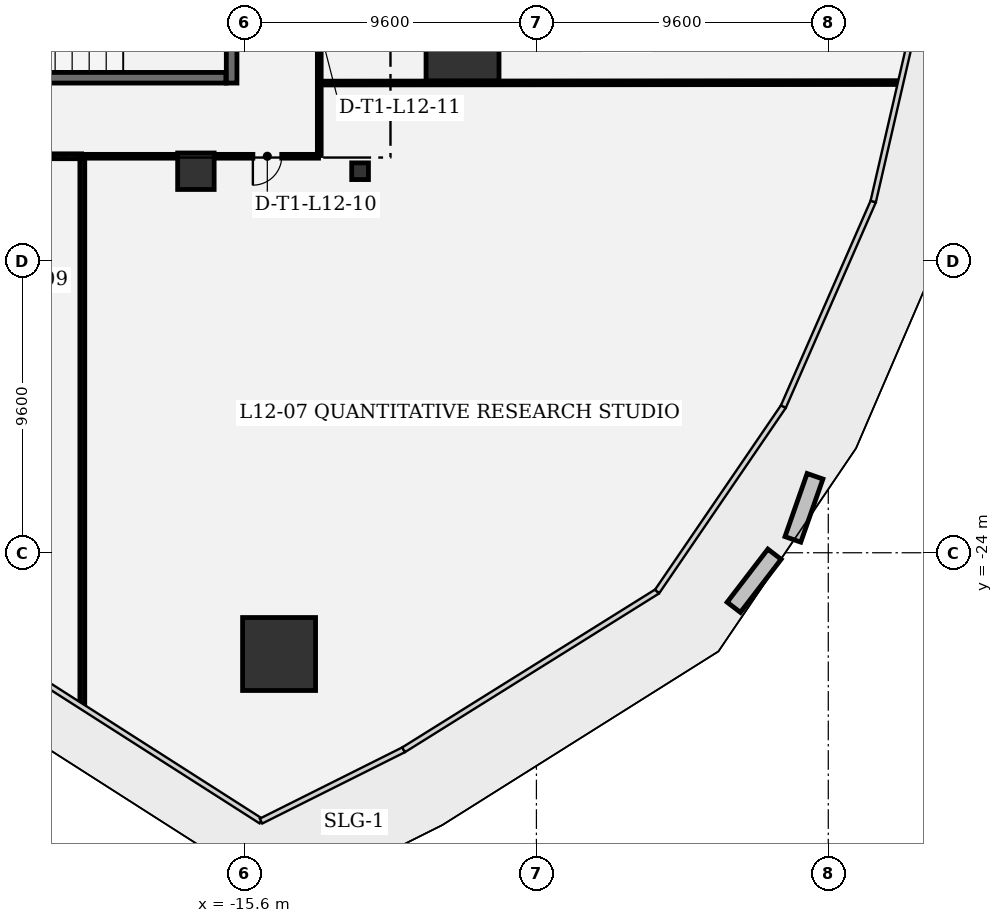
"""IFC4 building model, lengths in metres.
Left out: names, types, materials, properties, quantities, classifications, styles, units other than length and angle.
Written with IfcOpenShell. Run it as: python <this file> out.ifc"""

import sys

from ifc_helpers import new_model, si_unit, direction, frame, frame_2d, origin, origin_2d, place, context, subcontext, project, spatial, rectangle, extrude, element, fill, save


model = new_model("IFC4")
c1 = context("Model", 3, precision=1e-05, world=origin(), true_north=direction((0.0, 1.0)))
c2 = subcontext(c1, "Body", "Model", "MODEL_VIEW")
j1 = project(units=[si_unit("LENGTHUNIT", "METRE"), si_unit("PLANEANGLEUNIT", "RADIAN")], contexts=[c1])
p1 = place(None, origin())
s1 = spatial("IfcSite", under=j1, at=p1, CompositionType="ELEMENT")
p2 = place(p1, origin())
s2 = spatial("IfcBuilding", under=s1, at=p2, CompositionType="ELEMENT")
p3 = place(p2, frame((0.0, 0.0, 57.6)))
s3 = spatial("IfcBuildingStorey", under=s2, at=p3, CompositionType="ELEMENT", Elevation=57.6)
for number, where, z_axis, x_axis in (
    (1, (-14.464, -27.331, 0.0), (0.0, 0.0, 1.0), (1.0, 0.0, 0.0)),
    (2, (-8.43, -7.276, 0.0), (0.0, 0.0, 1.0), (1.0, 0.0, 0.0)),
):
    element("IfcColumn", number, at=place(p3, frame(where, z_axis=z_axis, x_axis=x_axis)), inside=s3, PredefinedType="COLUMN", context=c2, shape_type="SweptSolid", body=[
        extrude(rectangle(XDim=2.4, YDim=2.4, at=origin_2d()), origin(), (0.0, 0.0, 1.0), 4.2),
    ])
p4 = place(p3, frame((-17.2, -11.45, 0.0), z_axis=(0.0, 0.0, 1.0), x_axis=(1.0, 0.0, 0.0)))
e3 = element("IfcColumn", 3, at=p4, inside=s3, PredefinedType="COLUMN", context=c2, shape_type="SweptSolid", body=[
    extrude(rectangle(XDim=1.2, YDim=1.2, at=origin_2d()), origin(), (0.0, 0.0, 1.0), 4.2),
])
p5 = place(p3, frame((-11.8, -11.45, 0.0), z_axis=(0.0, 0.0, 1.0), x_axis=(1.0, 0.0, 0.0)))
e4 = element("IfcColumn", 4, at=p5, inside=s3, PredefinedType="COLUMN", context=c2, shape_type="SweptSolid", body=[
    extrude(rectangle(XDim=0.55, YDim=0.55, at=origin_2d()), origin(), (0.0, 0.0, 1.0), 4.2),
])
p6 = place(p3, frame((-16.025, -8.55, 0.0), z_axis=(0.0, 0.0, 1.0), x_axis=(0.0, 1.0, 0.0)))
e5 = element("IfcWall", 5, at=p6, inside=s3, PredefinedType="SHEAR", context=c2, shape_type="SweptSolid", body=[
    extrude(rectangle(XDim=4.61, YDim=0.35, at=frame_2d((2.305, 0.0))), origin(), (0.0, 0.0, 1.0), 3.92),
])
p7 = place(p3, frame((-24.335, -8.375, 0.0), z_axis=(0.0, 0.0, 1.0), x_axis=(1.0, 0.0, 0.0)))
e6 = element("IfcWall", 6, at=p7, inside=s3, PredefinedType="SHEAR", context=c2, shape_type="SweptSolid", body=[
    extrude(rectangle(XDim=8.12, YDim=0.35, at=frame_2d((4.06, 0.0))), origin(), (0.0, 0.0, 1.0), 3.92),
])
p8 = place(p7, frame((0.28, 0.0, 0.0)))
e7 = element("IfcOpeningElement", 7, at=p8, cuts=e6, PredefinedType="OPENING", context=c2, shape_type="SweptSolid", body=[
    extrude(rectangle(XDim=1.1, YDim=2.2, at=frame_2d((0.55, 1.1))), frame((0.0, 0.185, 0.0), z_axis=(0.0, -1.0, 0.0), x_axis=(1.0, 0.0, 0.0)), (0.0, 0.0, 1.0), 0.37),
])
p9 = place(p3, frame((-20.936, -28.989, 0.0), z_axis=(0.0, 0.0, 1.0), x_axis=(0.0, 1.0, 0.0)))
e8 = element("IfcWall", 8, at=p9, inside=s3, PredefinedType="PARTITIONING", context=c2, shape_type="SweptSolid", body=[
    extrude(rectangle(XDim=18.006, YDim=0.16, at=frame_2d((9.003, 0.0))), origin(), (0.0, 0.0, 1.0), 2.957),
])
p10 = place(p3, frame((-20.961, -10.958, 0.0), z_axis=(0.0, 0.0, 1.0), x_axis=(-1.0, 0.0, 0.0)))
e9 = element("IfcWall", 9, at=p10, inside=s3, PredefinedType="PARTITIONING", context=c2, shape_type="SweptSolid", body=[
    extrude(rectangle(XDim=1.974, YDim=0.16, at=frame_2d((0.987, 0.0))), origin(), (0.0, 0.0, 1.0), 3.92),
])
p11 = place(p3, frame((5.9, -8.534, 0.0), z_axis=(0.0, 0.0, 1.0), x_axis=(-0.99999966248, -0.000821608021, 0.0)))
e10 = element("IfcWall", 10, at=p11, inside=s3, PredefinedType="PARTITIONING", context=c2, shape_type="SweptSolid", body=[
    extrude(rectangle(XDim=19.018, YDim=0.125, at=frame_2d((9.509, 0.0))), origin(), (0.0, 0.0, 1.0), 2.957),
])
p12 = place(p3, frame((-13.142, -8.575, 0.0), z_axis=(0.0, 0.0, 1.0), x_axis=(0.0, -1.0, 0.0)))
e11 = element("IfcWall", 11, at=p12, inside=s3, PredefinedType="PARTITIONING", context=c2, shape_type="SweptSolid", body=[
    extrude(rectangle(XDim=2.358, YDim=0.125, at=frame_2d((1.179, 0.0))), origin(), (0.0, 0.0, 1.0), 3.92),
])
p13 = place(p3, frame((-13.167, -10.958, 0.0), z_axis=(0.0, 0.0, 1.0), x_axis=(-1.0, 0.0, 0.0)))
e12 = element("IfcWall", 12, at=p13, inside=s3, PredefinedType="PARTITIONING", context=c2, shape_type="SweptSolid", body=[
    extrude(rectangle(XDim=3.368, YDim=0.125, at=frame_2d((1.684, 0.0))), origin(), (0.0, 0.0, 1.0), 2.957),
])
p14 = place(p13, frame((1.209, 0.0, 0.0)))
e13 = element("IfcOpeningElement", 13, at=p14, cuts=e12, PredefinedType="OPENING", context=c2, shape_type="SweptSolid", body=[
    extrude(rectangle(XDim=0.95, YDim=2.15, at=frame_2d((0.475, 1.075))), frame((0.0, 0.073, 0.0), z_axis=(0.0, -1.0, 0.0), x_axis=(1.0, 0.0, 0.0)), (0.0, 0.0, 1.0), 0.145),
])
p15 = place(p3, frame((-17.865, -10.958, 0.0), z_axis=(0.0, 0.0, 1.0), x_axis=(-1.0, 0.0, 0.0)))
e14 = element("IfcWall", 14, at=p15, inside=s3, PredefinedType="PARTITIONING", context=c2, shape_type="SweptSolid", body=[
    extrude(rectangle(XDim=3.038, YDim=0.125, at=frame_2d((1.519, 0.0))), origin(), (0.0, 0.0, 1.0), 3.92),
])
p16 = place(p3, frame((-13.142, -4.903, 0.0), z_axis=(0.0, 0.0, 1.0), x_axis=(0.0, -1.0, 0.0)))
e15 = element("IfcWall", 15, at=p16, inside=s3, PredefinedType="PARTITIONING", context=c2, shape_type="SweptSolid", body=[
    extrude(rectangle(XDim=3.614, YDim=0.125, at=frame_2d((1.807, 0.0))), origin(), (0.0, 0.0, 1.0), 3.92),
])
p17 = place(p16, frame((1.332, 0.0, 0.0)))
e16 = element("IfcOpeningElement", 16, at=p17, cuts=e15, PredefinedType="OPENING", context=c2, shape_type="SweptSolid", body=[
    extrude(rectangle(XDim=0.95, YDim=2.15, at=frame_2d((0.475, 1.075))), frame((0.0, 0.073, 0.0), z_axis=(0.0, -1.0, 0.0), x_axis=(1.0, 0.0, 0.0)), (0.0, 0.0, 1.0), 0.145),
])
p18 = place(p14, origin())
e17 = element("IfcDoor", 17, at=p18, inside=s3, OperationType="SINGLE_SWING_RIGHT", PredefinedType="DOOR", context=c2, shape_type="SweptSolid", body=[
    extrude(rectangle(XDim=0.95, YDim=2.15, at=frame_2d((0.475, 1.075))), frame((0.0, 0.025, 0.0), z_axis=(0.0, -1.0, 0.0), x_axis=(1.0, 0.0, 0.0)), (0.0, 0.0, 1.0), 0.05),
])
fill(e13, e17)
save(model, sys.argv[1])
